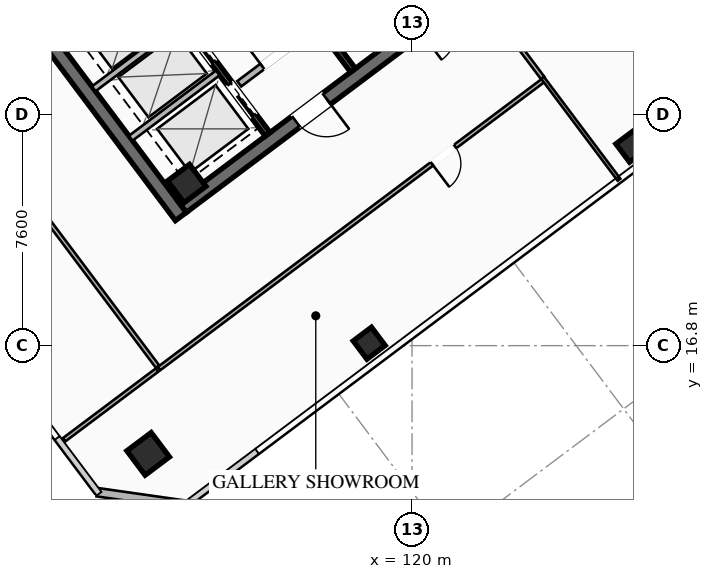
"""IFC4 building model, lengths in metres.
Left out: names, types, materials, properties, quantities, classifications, styles, units other than length and angle.
Written with IfcOpenShell. Run it as: python <this file> out.ifc"""

import sys

from ifc_helpers import new_model, si_unit, direction, frame, frame_2d, origin, origin_2d, place, context, subcontext, project, spatial, rectangle, hollow_rectangle, extrude, element, fill, save


model = new_model("IFC4")
c1 = context("Model", 3, precision=1e-05, world=origin(), true_north=direction((0.0, 1.0)))
c2 = subcontext(c1, "Body", "Model", "MODEL_VIEW")
j1 = project(units=[si_unit("LENGTHUNIT", "METRE"), si_unit("PLANEANGLEUNIT", "RADIAN")], contexts=[c1])
p1 = place(None, origin())
s1 = spatial("IfcSite", under=j1, at=p1, CompositionType="ELEMENT")
p2 = place(p1, origin())
s2 = spatial("IfcBuilding", under=s1, at=p2, CompositionType="ELEMENT")
p3 = place(p2, frame((0.0, 0.0, 229.05)))
s3 = spatial("IfcBuildingStorey", under=s2, at=p3, CompositionType="ELEMENT", Elevation=229.05)
p4 = place(p3, frame((112.396, 21.047, 0.0), z_axis=(0.0, 0.0, 1.0), x_axis=(-0.600005007985, 0.799996243986, 0.0)))
e1 = element("IfcWall", 1, at=p4, inside=s3, PredefinedType="SHEAR", context=c2, shape_type="SweptSolid", body=[
    extrude(rectangle(XDim=15.6, YDim=0.45, at=frame_2d((7.8, 0.0))), origin(), (0.0, 0.0, 1.0), 3.55),
])
p5 = place(p3, frame((124.649, 30.518, 0.0), z_axis=(0.0, 0.0, 1.0), x_axis=(-0.8, -0.6, 0.0)))
e2 = element("IfcWall", 2, at=p5, inside=s3, PredefinedType="SHEAR", context=c2, shape_type="SweptSolid", body=[
    extrude(rectangle(XDim=15.26, YDim=0.45, at=frame_2d((7.63, 0.0))), origin(), (0.0, 0.0, 1.0), 3.55),
])
p6 = place(p5, frame((9.33, 0.0, 0.0)))
e3 = element("IfcOpeningElement", 3, at=p6, cuts=e2, PredefinedType="OPENING", context=c2, shape_type="SweptSolid", body=[
    extrude(rectangle(XDim=1.25, YDim=2.25, at=frame_2d((0.625, 1.125))), frame((0.0, 0.235, 0.0), z_axis=(0.0, -1.0, 0.0), x_axis=(1.0, 0.0, 0.0)), (0.0, 0.0, 1.0), 0.47),
])
p7 = place(p5, frame((4.28, 0.0, 0.0)))
e4 = element("IfcOpeningElement", 4, at=p7, cuts=e2, PredefinedType="OPENING", context=c2, shape_type="SweptSolid", body=[
    extrude(rectangle(XDim=1.25, YDim=2.25, at=frame_2d((0.625, 1.125))), frame((0.0, 0.235, 0.0), z_axis=(0.0, -1.0, 0.0), x_axis=(1.0, 0.0, 0.0)), (0.0, 0.0, 1.0), 0.47),
])
p8 = place(p3, frame((112.59, 22.13, 0.0), z_axis=(0.0, 0.0, 1.0), x_axis=(0.799999996291, 0.600000004945, 0.0)))
e5 = element("IfcColumn", 5, at=p8, inside=s3, PredefinedType="COLUMN", context=c2, shape_type="SweptSolid", body=[
    extrude(hollow_rectangle(XDim=0.9, YDim=0.9, WallThickness=0.04, at=origin_2d()), origin(), (0.0, 0.0, 1.0), 3.37),
])
p9 = place(p3, frame((111.32, 13.24, 0.0), z_axis=(0.0, 0.0, 1.0), x_axis=(0.799999996291, 0.600000004945, 0.0)))
e6 = element("IfcColumn", 6, at=p9, inside=s3, PredefinedType="COLUMN", context=c2, shape_type="SweptSolid", body=[
    extrude(hollow_rectangle(XDim=1.0, YDim=1.0, WallThickness=0.04, at=origin_2d()), origin(), (0.0, 0.0, 1.0), 3.37),
])
for number, where, z_axis, x_axis in (
    (7, (118.59, 16.88, 0.0), (0.0, 0.0, 1.0), (0.8, 0.6, 0.0)),
    (8, (127.23, 23.36, 0.0), (0.0, 0.0, 1.0), (0.8, 0.6, 0.0)),
):
    element("IfcColumn", number, at=place(p3, frame(where, z_axis=z_axis, x_axis=x_axis)), inside=s3, PredefinedType="COLUMN", context=c2, shape_type="SweptSolid", body=[
        extrude(hollow_rectangle(XDim=0.75, YDim=0.75, WallThickness=0.032, at=origin_2d()), origin(), (0.0, 0.0, 1.0), 3.37),
    ])
p10 = place(p3, frame((112.58, 11.56, 0.0), z_axis=(0.0, 0.0, 1.0), x_axis=(-0.989954425158, 0.14138683146, 0.0)))
e9 = element("IfcWall", 9, at=p10, inside=s3, PredefinedType="SOLIDWALL", context=c2, shape_type="SweptSolid", body=[
    extrude(rectangle(XDim=2.97, YDim=0.28, at=frame_2d((1.485, 0.0))), origin(), (0.0, 0.0, 1.0), 3.37),
])
p11 = place(p3, frame((118.058, 25.856, 0.0), z_axis=(0.0, 0.0, 1.0), x_axis=(-0.600002657301, 0.799998007018, 0.0)))
e10 = element("IfcWall", 10, at=p11, inside=s3, PredefinedType="SHEAR", context=c2, shape_type="SweptSolid", body=[
    extrude(rectangle(XDim=14.7, YDim=0.2, at=frame_2d((7.35, 0.0))), origin(), (0.0, 0.0, 1.0), 3.37),
])
p12 = place(p3, frame((114.316, 25.412, 0.0), z_axis=(0.0, 0.0, 1.0), x_axis=(0.800018601094, 0.59997519774, 0.0)))
e11 = element("IfcWall", 11, at=p12, inside=s3, PredefinedType="SOLIDWALL", context=c2, shape_type="SweptSolid", body=[
    extrude(rectangle(XDim=3.15, YDim=0.22, at=frame_2d((1.575, 0.0))), origin(), (0.0, 0.0, 1.0), 2.513),
])
p13 = place(p12, frame((0.95, 0.0, 0.0)))
e12 = element("IfcOpeningElement", 12, at=p13, cuts=e11, PredefinedType="OPENING", context=c2, shape_type="SweptSolid", body=[
    extrude(rectangle(XDim=1.25, YDim=2.25, at=frame_2d((0.625, 1.125))), frame((0.0, 0.12, 0.0), z_axis=(0.0, -1.0, 0.0), x_axis=(1.0, 0.0, 0.0)), (0.0, 0.0, 1.0), 0.24),
])
p14 = place(p3, frame((115.25, 23.75, 0.0), z_axis=(0.0, 0.0, 1.0), x_axis=(-0.599994036198, 0.800004472816, 0.0)))
e13 = element("IfcWall", 13, at=p14, inside=s3, PredefinedType="SHEAR", context=c2, shape_type="SweptSolid", body=[
    extrude(rectangle(XDim=6.55, YDim=0.2, at=frame_2d((3.275, 0.0))), origin(), (0.0, 0.0, 1.0), 3.37),
])
p15 = place(p14, frame((4.975, 0.0, 0.0)))
e14 = element("IfcOpeningElement", 14, at=p15, cuts=e13, PredefinedType="OPENING", context=c2, shape_type="SweptSolid", body=[
    extrude(rectangle(XDim=1.3, YDim=2.25, at=frame_2d((0.65, 1.125))), frame((0.0, 0.11, 0.0), z_axis=(0.0, -1.0, 0.0), x_axis=(1.0, 0.0, 0.0)), (0.0, 0.0, 1.0), 0.22),
])
p16 = place(p14, frame((2.975, 0.0, 0.0)))
e15 = element("IfcOpeningElement", 15, at=p16, cuts=e13, PredefinedType="OPENING", context=c2, shape_type="SweptSolid", body=[
    extrude(rectangle(XDim=1.3, YDim=2.25, at=frame_2d((0.65, 1.125))), frame((0.0, 0.11, 0.0), z_axis=(0.0, -1.0, 0.0), x_axis=(1.0, 0.0, 0.0)), (0.0, 0.0, 1.0), 0.22),
])
p17 = place(p14, frame((0.775, 0.0, 0.0)))
e16 = element("IfcOpeningElement", 16, at=p17, cuts=e13, PredefinedType="OPENING", context=c2, shape_type="SweptSolid", body=[
    extrude(rectangle(XDim=1.3, YDim=2.25, at=frame_2d((0.65, 1.125))), frame((0.0, 0.11, 0.0), z_axis=(0.0, -1.0, 0.0), x_axis=(1.0, 0.0, 0.0)), (0.0, 0.0, 1.0), 0.22),
])
for number, where, z_axis, x_axis in (
    (17, (110.746, 23.622, 0.0), (0.0, 0.0, 1.0), (0.8, 0.6, 0.0)),
    (18, (109.528, 25.246, 0.0), (0.0, 0.0, 1.0), (0.8, 0.6, 0.0)),
):
    element("IfcWall", number, at=place(p3, frame(where, z_axis=z_axis, x_axis=x_axis)), inside=s3, PredefinedType="SOLIDWALL", context=c2, shape_type="SweptSolid", body=[
        extrude(rectangle(XDim=3.58, YDim=0.2, at=frame_2d((1.79, 0.0))), origin(), (0.0, 0.0, 1.0), 3.37),
    ])
p18 = place(p3, frame((124.342, 25.544, 0.0), z_axis=(0.0, 0.0, 1.0), x_axis=(-0.8, -0.6, 0.0)))
e19 = element("IfcWall", 19, at=p18, inside=s3, PredefinedType="PARTITIONING", context=c2, shape_type="SweptSolid", body=[
    extrude(rectangle(XDim=15.83, YDim=0.135, at=frame_2d((7.915, 0.0))), origin(), (0.0, 0.0, 1.0), 2.513),
])
p19 = place(p18, frame((3.658, 0.0, 0.0)))
e20 = element("IfcOpeningElement", 20, at=p19, cuts=e19, PredefinedType="OPENING", context=c2, shape_type="SweptSolid", body=[
    extrude(rectangle(XDim=0.95, YDim=2.05, at=frame_2d((0.475, 1.025))), frame((0.0, 0.077, 0.0), z_axis=(0.0, -1.0, 0.0), x_axis=(1.0, 0.0, 0.0)), (0.0, 0.0, 1.0), 0.155),
])
p20 = place(p3, frame((122.248, 28.336, 0.0), z_axis=(0.0, 0.0, 1.0), x_axis=(0.599977088934, -0.800017182787, 0.0)))
e21 = element("IfcWall", 21, at=p20, inside=s3, PredefinedType="PARTITIONING", context=c2, shape_type="SweptSolid", body=[
    extrude(rectangle(XDim=3.41, YDim=0.135, at=frame_2d((1.705, 0.0))), origin(), (0.0, 0.0, 1.0), 2.513),
])
p21 = place(p20, frame((0.25, 0.0, 0.0)))
e22 = element("IfcOpeningElement", 22, at=p21, cuts=e21, PredefinedType="OPENING", context=c2, shape_type="SweptSolid", body=[
    extrude(rectangle(XDim=0.95, YDim=2.05, at=frame_2d((0.475, 1.025))), frame((0.0, 0.077, 0.0), z_axis=(0.0, -1.0, 0.0), x_axis=(1.0, 0.0, 0.0)), (0.0, 0.0, 1.0), 0.155),
])
p22 = place(p3, frame((126.808, 22.256, 0.0), z_axis=(0.0, 0.0, 1.0), x_axis=(-0.600046613595, 0.799965037682, 0.0)))
e23 = element("IfcWall", 23, at=p22, inside=s3, PredefinedType="PARTITIONING", context=c2, shape_type="SweptSolid", body=[
    extrude(rectangle(XDim=4.19, YDim=0.11, at=frame_2d((2.095, 0.0))), origin(), (0.0, 0.0, 1.0), 2.513),
])
p23 = place(p3, frame((111.63, 16.11, 0.0), z_axis=(0.0, 0.0, 1.0), x_axis=(-0.599998196544, 0.800001352589, 0.0)))
e24 = element("IfcWall", 24, at=p23, inside=s3, PredefinedType="PARTITIONING", context=c2, shape_type="SweptSolid", body=[
    extrude(rectangle(XDim=21.66, YDim=0.135, at=frame_2d((10.83, 0.0))), origin(), (0.0, 0.0, 1.0), 2.513),
])
p24 = place(p23, frame((11.109, 0.0, 0.0)))
e25 = element("IfcOpeningElement", 25, at=p24, cuts=e24, PredefinedType="OPENING", context=c2, shape_type="SweptSolid", body=[
    extrude(rectangle(XDim=0.95, YDim=2.05, at=frame_2d((0.475, 1.025))), frame((0.0, 0.077, 0.0), z_axis=(0.0, -1.0, 0.0), x_axis=(1.0, 0.0, 0.0)), (0.0, 0.0, 1.0), 0.155),
])
p25 = place(p3, frame((108.558, 13.706, 0.0), z_axis=(0.0, 0.0, 1.0), x_axis=(0.799992330439, 0.600010225945, 0.0)))
e26 = element("IfcWall", 26, at=p25, inside=s3, PredefinedType="PARTITIONING", context=c2, shape_type="SweptSolid", body=[
    extrude(rectangle(XDim=3.82, YDim=0.135, at=frame_2d((1.91, 0.0))), origin(), (0.0, 0.0, 1.0), 2.513),
])
p26 = place(p6, origin())
e27 = element("IfcDoor", 27, at=p26, inside=s3, OperationType="SINGLE_SWING_LEFT", PredefinedType="DOOR", context=c2, shape_type="SweptSolid", body=[
    extrude(rectangle(XDim=1.25, YDim=2.25, at=frame_2d((0.625, 1.125))), frame((0.0, 0.025, 0.0), z_axis=(0.0, -1.0, 0.0), x_axis=(1.0, 0.0, 0.0)), (0.0, 0.0, 1.0), 0.05),
])
fill(e3, e27)
p27 = place(p13, origin())
e28 = element("IfcDoor", 28, at=p27, inside=s3, OperationType="SINGLE_SWING_LEFT", PredefinedType="DOOR", context=c2, shape_type="SweptSolid", body=[
    extrude(rectangle(XDim=1.25, YDim=2.25, at=frame_2d((0.625, 1.125))), frame((0.0, 0.025, 0.0), z_axis=(0.0, -1.0, 0.0), x_axis=(1.0, 0.0, 0.0)), (0.0, 0.0, 1.0), 0.05),
])
fill(e12, e28)
p28 = place(p19, origin())
e29 = element("IfcDoor", 29, at=p28, inside=s3, OperationType="SINGLE_SWING_RIGHT", PredefinedType="DOOR", context=c2, shape_type="SweptSolid", body=[
    extrude(rectangle(XDim=0.95, YDim=2.05, at=frame_2d((0.475, 1.025))), frame((0.0, 0.025, 0.0), z_axis=(0.0, -1.0, 0.0), x_axis=(1.0, 0.0, 0.0)), (0.0, 0.0, 1.0), 0.05),
])
fill(e20, e29)
p29 = place(p16, origin())
e30 = element("IfcDoor", 30, at=p29, inside=s3, OperationType="SLIDING_TO_LEFT", PredefinedType="DOOR", context=c2, shape_type="SweptSolid", body=[
    extrude(rectangle(XDim=1.3, YDim=2.25, at=frame_2d((0.65, 1.125))), frame((0.0, 0.025, 0.0), z_axis=(0.0, -1.0, 0.0), x_axis=(1.0, 0.0, 0.0)), (0.0, 0.0, 1.0), 0.05),
])
fill(e15, e30)
p30 = place(p17, origin())
e31 = element("IfcDoor", 31, at=p30, inside=s3, OperationType="SLIDING_TO_LEFT", PredefinedType="DOOR", context=c2, shape_type="SweptSolid", body=[
    extrude(rectangle(XDim=1.3, YDim=2.25, at=frame_2d((0.65, 1.125))), frame((0.0, 0.025, 0.0), z_axis=(0.0, -1.0, 0.0), x_axis=(1.0, 0.0, 0.0)), (0.0, 0.0, 1.0), 0.05),
])
fill(e16, e31)
save(model, sys.argv[1])
